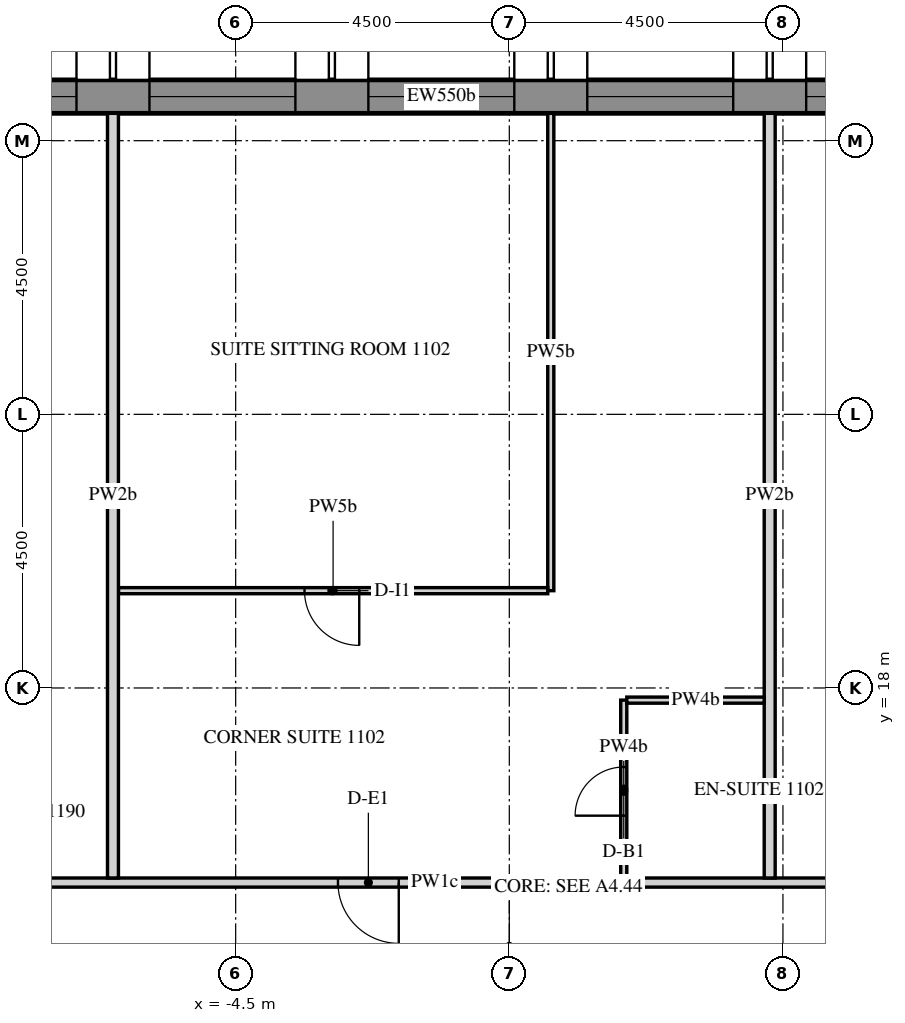
"""IFC4 building model, lengths in metres.
Left out: names, types, materials, properties, quantities, classifications, styles, units other than length and angle.
Written with IfcOpenShell. Run it as: python <this file> out.ifc"""

import sys

from ifc_helpers import new_model, si_unit, direction, frame, frame_2d, origin, place, context, subcontext, project, spatial, polyline, rectangle, outline, extrude, element, fill, save


model = new_model("IFC4")
c1 = context("Model", 3, precision=1e-05, world=origin(), true_north=direction((0.0, 1.0)))
c2 = subcontext(c1, "Body", "Model", "MODEL_VIEW")
j1 = project(units=[si_unit("LENGTHUNIT", "METRE"), si_unit("PLANEANGLEUNIT", "RADIAN")], contexts=[c1])
p1 = place(None, origin())
s1 = spatial("IfcSite", under=j1, at=p1, CompositionType="ELEMENT")
p2 = place(p1, origin())
s2 = spatial("IfcBuilding", under=s1, at=p2, CompositionType="ELEMENT")
p3 = place(p2, frame((0.0, 0.0, 152.7)))
s3 = spatial("IfcBuildingStorey", under=s2, at=p3, CompositionType="ELEMENT", Elevation=152.7)
p4 = place(p3, frame((12.761, 27.725, 0.0), z_axis=(0.0, 0.0, 1.0), x_axis=(-1.0, 0.0, 0.0)))
e1 = element("IfcWall", 1, at=p4, inside=s3, PredefinedType="SOLIDWALL", context=c2, shape_type="SweptSolid", body=[
    extrude(outline(polyline([(-0.022, -0.275), (27.783, -0.275), (27.732, 0.275), (0.022, 0.275), (-0.022, -0.275)])), origin(), (0.0, 0.0, 1.0), 3.75),
])
p5 = place(p4, frame((1.879, 0.0, 0.9)))
e2 = element("IfcOpeningElement", 2, at=p5, cuts=e1, PredefinedType="OPENING", context=c2, shape_type="SweptSolid", body=[
    extrude(rectangle(XDim=2.4, YDim=2.4, at=frame_2d((1.2, 1.2))), frame((0.0, 0.285, 0.0), z_axis=(0.0, -1.0, 0.0), x_axis=(1.0, 0.0, 0.0)), (0.0, 0.0, 1.0), 0.57),
])
p6 = place(p4, frame((5.479, 0.0, 0.9)))
e3 = element("IfcOpeningElement", 3, at=p6, cuts=e1, PredefinedType="OPENING", context=c2, shape_type="SweptSolid", body=[
    extrude(rectangle(XDim=2.4, YDim=2.4, at=frame_2d((1.2, 1.2))), frame((0.0, 0.285, 0.0), z_axis=(0.0, -1.0, 0.0), x_axis=(1.0, 0.0, 0.0)), (0.0, 0.0, 1.0), 0.57),
])
p7 = place(p4, frame((9.079, 0.0, 0.9)))
e4 = element("IfcOpeningElement", 4, at=p7, cuts=e1, PredefinedType="OPENING", context=c2, shape_type="SweptSolid", body=[
    extrude(rectangle(XDim=2.4, YDim=2.4, at=frame_2d((1.2, 1.2))), frame((0.0, 0.285, 0.0), z_axis=(0.0, -1.0, 0.0), x_axis=(1.0, 0.0, 0.0)), (0.0, 0.0, 1.0), 0.57),
])
p8 = place(p4, frame((12.679, 0.0, 0.9)))
e5 = element("IfcOpeningElement", 5, at=p8, cuts=e1, PredefinedType="OPENING", context=c2, shape_type="SweptSolid", body=[
    extrude(rectangle(XDim=2.4, YDim=2.4, at=frame_2d((1.2, 1.2))), frame((0.0, 0.285, 0.0), z_axis=(0.0, -1.0, 0.0), x_axis=(1.0, 0.0, 0.0)), (0.0, 0.0, 1.0), 0.57),
])
p9 = place(p4, frame((16.279, 0.0, 0.9)))
e6 = element("IfcOpeningElement", 6, at=p9, cuts=e1, PredefinedType="OPENING", context=c2, shape_type="SweptSolid", body=[
    extrude(rectangle(XDim=2.4, YDim=2.4, at=frame_2d((1.2, 1.2))), frame((0.0, 0.285, 0.0), z_axis=(0.0, -1.0, 0.0), x_axis=(1.0, 0.0, 0.0)), (0.0, 0.0, 1.0), 0.57),
])
p10 = place(p4, frame((19.879, 0.0, 0.9)))
e7 = element("IfcOpeningElement", 7, at=p10, cuts=e1, PredefinedType="OPENING", context=c2, shape_type="SweptSolid", body=[
    extrude(rectangle(XDim=2.4, YDim=2.4, at=frame_2d((1.2, 1.2))), frame((0.0, 0.285, 0.0), z_axis=(0.0, -1.0, 0.0), x_axis=(1.0, 0.0, 0.0)), (0.0, 0.0, 1.0), 0.57),
])
p11 = place(p4, frame((23.479, 0.0, 0.9)))
e8 = element("IfcOpeningElement", 8, at=p11, cuts=e1, PredefinedType="OPENING", context=c2, shape_type="SweptSolid", body=[
    extrude(rectangle(XDim=2.4, YDim=2.4, at=frame_2d((1.2, 1.2))), frame((0.0, 0.285, 0.0), z_axis=(0.0, -1.0, 0.0), x_axis=(1.0, 0.0, 0.0)), (0.0, 0.0, 1.0), 0.57),
])
p12 = place(p3, frame((6.091, 14.8, 0.0), z_axis=(0.0, 0.0, 1.0), x_axis=(-1.0, 0.0, 0.0)))
e9 = element("IfcWall", 9, at=p12, inside=s3, PredefinedType="PARTITIONING", context=c2, shape_type="SweptSolid", body=[
    extrude(rectangle(XDim=14.636, YDim=0.15, at=frame_2d((7.318, 0.0))), origin(), (0.0, 0.0, 1.0), 2.823),
])
p13 = place(p12, frame((7.909, 0.0, 0.0)))
e10 = element("IfcOpeningElement", 10, at=p13, cuts=e9, PredefinedType="OPENING", context=c2, shape_type="SweptSolid", body=[
    extrude(rectangle(XDim=1.0, YDim=2.1, at=frame_2d((0.5, 1.05))), frame((0.0, 0.085, 0.0), z_axis=(0.0, -1.0, 0.0), x_axis=(1.0, 0.0, 0.0)), (0.0, 0.0, 1.0), 0.17),
])
p14 = place(p3, frame((4.282, 27.45, 0.0), z_axis=(0.0, 0.0, 1.0), x_axis=(0.0, -1.0, 0.0)))
e11 = element("IfcWall", 11, at=p14, inside=s3, PredefinedType="PARTITIONING", context=c2, shape_type="SweptSolid", body=[
    extrude(rectangle(XDim=12.575, YDim=0.18, at=frame_2d((6.288, 0.0))), origin(), (0.0, 0.0, 1.0), 2.823),
])
p15 = place(p3, frame((1.882, 14.875, 0.0), z_axis=(0.0, 0.0, 1.0), x_axis=(0.0, 1.0, 0.0)))
e12 = element("IfcWall", 12, at=p15, inside=s3, PredefinedType="PARTITIONING", context=c2, shape_type="SweptSolid", body=[
    extrude(rectangle(XDim=2.925, YDim=0.1, at=frame_2d((1.462, 0.0))), origin(), (0.0, 0.0, 1.0), 2.823),
])
p16 = place(p15, frame((1.025, 0.0, 0.0)))
e13 = element("IfcOpeningElement", 13, at=p16, cuts=e12, PredefinedType="OPENING", context=c2, shape_type="SweptSolid", body=[
    extrude(rectangle(XDim=0.8, YDim=2.1, at=frame_2d((0.4, 1.05))), frame((0.0, 0.06, 0.0), z_axis=(0.0, -1.0, 0.0), x_axis=(1.0, 0.0, 0.0)), (0.0, 0.0, 1.0), 0.12),
])
p17 = place(p3, frame((1.932, 17.8, 0.0), z_axis=(0.0, 0.0, 1.0), x_axis=(1.0, 0.0, 0.0)))
e14 = element("IfcWall", 14, at=p17, inside=s3, PredefinedType="PARTITIONING", context=c2, shape_type="SweptSolid", body=[
    extrude(rectangle(XDim=2.26, YDim=0.1, at=frame_2d((1.13, 0.0))), origin(), (0.0, 0.0, 1.0), 2.823),
])
p18 = place(p3, frame((0.682, 27.45, 0.0), z_axis=(0.0, 0.0, 1.0), x_axis=(0.0, -1.0, 0.0)))
e15 = element("IfcWall", 15, at=p18, inside=s3, PredefinedType="PARTITIONING", context=c2, shape_type="SweptSolid", body=[
    extrude(rectangle(XDim=7.85, YDim=0.1, at=frame_2d((3.925, 0.0))), origin(), (0.0, 0.0, 1.0), 2.823),
])
p19 = place(p3, frame((0.632, 19.6, 0.0), z_axis=(0.0, 0.0, 1.0), x_axis=(-1.0, 0.0, 0.0)))
e16 = element("IfcWall", 16, at=p19, inside=s3, PredefinedType="PARTITIONING", context=c2, shape_type="SweptSolid", body=[
    extrude(rectangle(XDim=7.06, YDim=0.1, at=frame_2d((3.53, 0.0))), origin(), (0.0, 0.0, 1.0), 2.823),
])
p20 = place(p19, frame((3.1, 0.0, 0.0)))
e17 = element("IfcOpeningElement", 17, at=p20, cuts=e16, PredefinedType="OPENING", context=c2, shape_type="SweptSolid", body=[
    extrude(rectangle(XDim=0.9, YDim=2.1, at=frame_2d((0.45, 1.05))), frame((0.0, 0.06, 0.0), z_axis=(0.0, -1.0, 0.0), x_axis=(1.0, 0.0, 0.0)), (0.0, 0.0, 1.0), 0.12),
])
p21 = place(p3, frame((-6.518, 27.45, 0.0), z_axis=(0.0, 0.0, 1.0), x_axis=(0.0, -1.0, 0.0)))
e18 = element("IfcWall", 18, at=p21, inside=s3, PredefinedType="PARTITIONING", context=c2, shape_type="SweptSolid", body=[
    extrude(rectangle(XDim=12.575, YDim=0.18, at=frame_2d((6.288, 0.0))), origin(), (0.0, 0.0, 1.0), 2.823),
])
p22 = place(p6, frame((0.0, 0.205, 0.0)))
e19 = element("IfcWindow", 19, at=p22, inside=s3, PartitioningType="DOUBLE_PANEL_VERTICAL", PredefinedType="WINDOW", context=c2, shape_type="SweptSolid", body=[
    extrude(rectangle(XDim=2.4, YDim=2.4, at=frame_2d((1.2, 1.2))), frame((0.0, 0.03, 0.0), z_axis=(0.0, -1.0, 0.0), x_axis=(1.0, 0.0, 0.0)), (0.0, 0.0, 1.0), 0.06),
])
fill(e3, e19)
p23 = place(p7, frame((0.0, 0.205, 0.0)))
e20 = element("IfcWindow", 20, at=p23, inside=s3, PartitioningType="DOUBLE_PANEL_VERTICAL", PredefinedType="WINDOW", context=c2, shape_type="SweptSolid", body=[
    extrude(rectangle(XDim=2.4, YDim=2.4, at=frame_2d((1.2, 1.2))), frame((0.0, 0.03, 0.0), z_axis=(0.0, -1.0, 0.0), x_axis=(1.0, 0.0, 0.0)), (0.0, 0.0, 1.0), 0.06),
])
fill(e4, e20)
p24 = place(p8, frame((0.0, 0.205, 0.0)))
e21 = element("IfcWindow", 21, at=p24, inside=s3, PartitioningType="DOUBLE_PANEL_VERTICAL", PredefinedType="WINDOW", context=c2, shape_type="SweptSolid", body=[
    extrude(rectangle(XDim=2.4, YDim=2.4, at=frame_2d((1.2, 1.2))), frame((0.0, 0.03, 0.0), z_axis=(0.0, -1.0, 0.0), x_axis=(1.0, 0.0, 0.0)), (0.0, 0.0, 1.0), 0.06),
])
fill(e5, e21)
p25 = place(p9, frame((0.0, 0.205, 0.0)))
e22 = element("IfcWindow", 22, at=p25, inside=s3, PartitioningType="DOUBLE_PANEL_VERTICAL", PredefinedType="WINDOW", context=c2, shape_type="SweptSolid", body=[
    extrude(rectangle(XDim=2.4, YDim=2.4, at=frame_2d((1.2, 1.2))), frame((0.0, 0.03, 0.0), z_axis=(0.0, -1.0, 0.0), x_axis=(1.0, 0.0, 0.0)), (0.0, 0.0, 1.0), 0.06),
])
fill(e6, e22)
p26 = place(p10, frame((0.0, 0.205, 0.0)))
e23 = element("IfcWindow", 23, at=p26, inside=s3, PartitioningType="DOUBLE_PANEL_VERTICAL", PredefinedType="WINDOW", context=c2, shape_type="SweptSolid", body=[
    extrude(rectangle(XDim=2.4, YDim=2.4, at=frame_2d((1.2, 1.2))), frame((0.0, 0.03, 0.0), z_axis=(0.0, -1.0, 0.0), x_axis=(1.0, 0.0, 0.0)), (0.0, 0.0, 1.0), 0.06),
])
fill(e7, e23)
p27 = place(p13, origin())
e24 = element("IfcDoor", 24, at=p27, inside=s3, OperationType="SINGLE_SWING_RIGHT", PredefinedType="DOOR", context=c2, shape_type="SweptSolid", body=[
    extrude(rectangle(XDim=1.0, YDim=2.1, at=frame_2d((0.5, 1.05))), frame((0.0, 0.025, 0.0), z_axis=(0.0, -1.0, 0.0), x_axis=(1.0, 0.0, 0.0)), (0.0, 0.0, 1.0), 0.05),
])
fill(e10, e24)
p28 = place(p16, origin())
e25 = element("IfcDoor", 25, at=p28, inside=s3, OperationType="SINGLE_SWING_RIGHT", PredefinedType="DOOR", context=c2, shape_type="SweptSolid", body=[
    extrude(rectangle(XDim=0.8, YDim=2.1, at=frame_2d((0.4, 1.05))), frame((0.0, 0.025, 0.0), z_axis=(0.0, -1.0, 0.0), x_axis=(1.0, 0.0, 0.0)), (0.0, 0.0, 1.0), 0.05),
])
fill(e13, e25)
p29 = place(p20, origin())
e26 = element("IfcDoor", 26, at=p29, inside=s3, OperationType="SINGLE_SWING_RIGHT", PredefinedType="DOOR", context=c2, shape_type="SweptSolid", body=[
    extrude(rectangle(XDim=0.9, YDim=2.1, at=frame_2d((0.45, 1.05))), frame((0.0, 0.025, 0.0), z_axis=(0.0, -1.0, 0.0), x_axis=(1.0, 0.0, 0.0)), (0.0, 0.0, 1.0), 0.05),
])
fill(e17, e26)
save(model, sys.argv[1])
